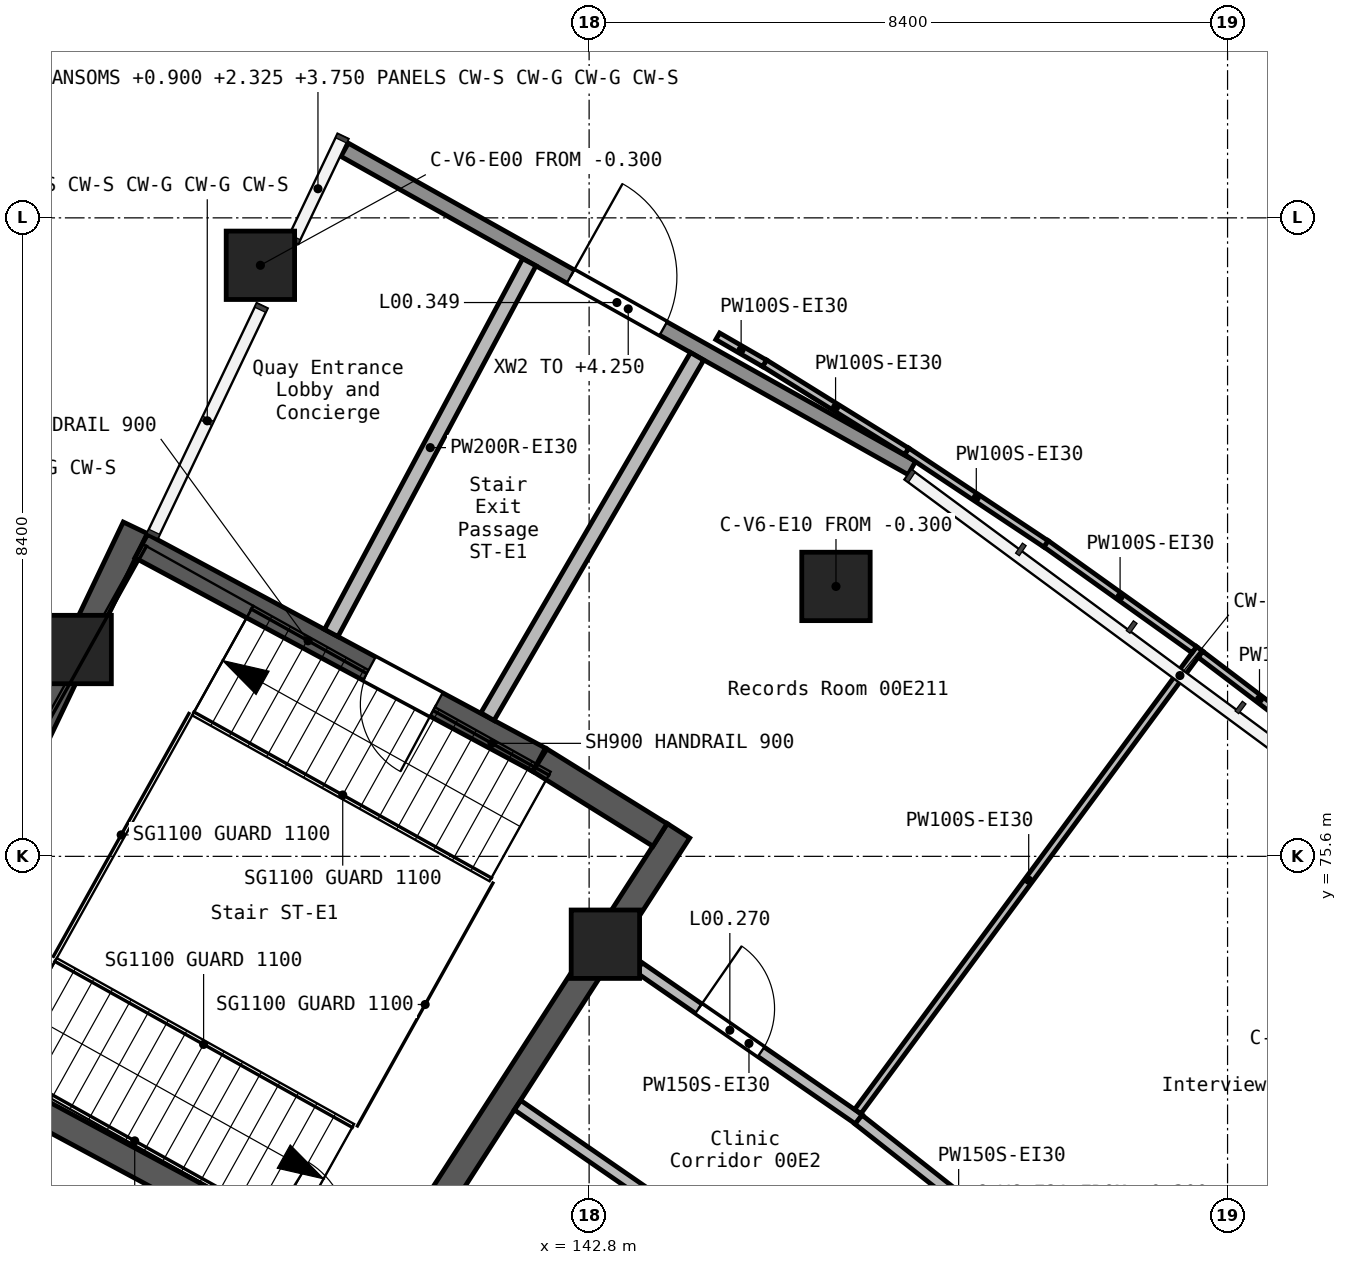
"""IFC4 building model, lengths in metres.
Left out: names, types, materials, properties, quantities, classifications, styles, units other than length and angle.
Written with IfcOpenShell. Run it as: python <this file> out.ifc"""

import sys

from ifc_helpers import new_model, si_unit, direction, frame, frame_2d, origin, origin_2d, place, context, subcontext, project, spatial, rectangle, extrude, element, fill, save


model = new_model("IFC4")
c1 = context("Model", 3, precision=1e-05, world=origin(), true_north=direction((0.0, 1.0)))
c2 = subcontext(c1, "Body", "Model", "MODEL_VIEW")
j1 = project(units=[si_unit("LENGTHUNIT", "METRE"), si_unit("PLANEANGLEUNIT", "RADIAN")], contexts=[c1])
p1 = place(None, origin())
s1 = spatial("IfcSite", under=j1, at=p1, CompositionType="ELEMENT")
p2 = place(p1, origin())
s2 = spatial("IfcBuilding", under=s1, at=p2, CompositionType="ELEMENT")
p3 = place(p2, origin())
s3 = spatial("IfcBuildingStorey", under=s2, at=p3, CompositionType="ELEMENT", Elevation=0.0)
for number, where, z_axis, x_axis in (
    (1, (136.064, 78.321, -0.3), (0.0, 0.0, 1.0), (1.0, 0.0, 0.0)),
    (2, (138.475, 83.376, -0.3), (0.0, 0.0, 1.0), (1.0, 0.0, 0.0)),
    (3, (143.014, 74.444, -0.3), (0.0, 0.0, 1.0), (1.0, 0.0, 0.0)),
    (4, (146.048, 79.151, -0.3), (0.0, 0.0, 1.0), (1.0, 0.0, 0.0)),
):
    element("IfcColumn", number, at=place(p3, frame(where, z_axis=z_axis, x_axis=x_axis)), inside=s3, PredefinedType="COLUMN", context=c2, shape_type="SweptSolid", body=[
        extrude(rectangle(XDim=0.9, YDim=0.9, at=origin_2d()), origin(), (0.0, 0.0, 1.0), 5.7),
    ])
p4 = place(p3, frame((133.578, 73.109, -0.3), z_axis=(0.0, 0.0, 1.0), x_axis=(0.430592498036, 0.90254645345, 0.0)))
e5 = element("IfcWall", 5, at=p4, inside=s3, PredefinedType="SHEAR", context=c2, shape_type="SweptSolid", body=[
    extrude(rectangle(XDim=7.55, YDim=0.35, at=frame_2d((3.775, 0.0))), origin(), (0.0, 0.0, 1.0), 5.7),
])
p5 = place(p3, frame((138.436, 70.698, -0.3), z_axis=(0.0, 0.0, 1.0), x_axis=(-0.880959996263, 0.473190749048, 0.0)))
e6 = element("IfcWall", 6, at=p5, inside=s3, PredefinedType="SHEAR", context=c2, shape_type="SweptSolid", body=[
    extrude(rectangle(XDim=5.254, YDim=0.35, at=frame_2d((2.627, 0.0))), origin(), (0.0, 0.0, 1.0), 5.7),
])
p6 = place(p3, frame((140.074, 69.885, -0.3), z_axis=(0.0, 0.0, 1.0), x_axis=(0.541951537975, 0.840409739643, 0.0)))
e7 = element("IfcWall", 7, at=p6, inside=s3, PredefinedType="SHEAR", context=c2, shape_type="SweptSolid", body=[
    extrude(rectangle(XDim=7.2, YDim=0.35, at=frame_2d((3.6, 0.0))), origin(), (0.0, 0.0, 1.0), 5.7),
])
p7 = place(p3, frame((142.142, 76.871, -0.3), z_axis=(0.0, 0.0, 1.0), x_axis=(-0.880979840223, 0.473153802817, 0.0)))
e8 = element("IfcWall", 8, at=p7, inside=s3, PredefinedType="SHEAR", context=c2, shape_type="SweptSolid", body=[
    extrude(rectangle(XDim=5.942, YDim=0.35, at=frame_2d((2.971, 0.0))), origin(), (0.0, 0.0, 1.0), 5.7),
])
p8 = place(p7, frame((1.535, 0.0, 0.3)))
e9 = element("IfcOpeningElement", 9, at=p8, cuts=e8, PredefinedType="OPENING", context=c2, shape_type="SweptSolid", body=[
    extrude(rectangle(XDim=1.0, YDim=2.1, at=frame_2d((0.5, 1.05))), frame((0.0, 0.185, 0.0), z_axis=(0.0, -1.0, 0.0), x_axis=(1.0, 0.0, 0.0)), (0.0, 0.0, 1.0), 0.37),
])
p9 = place(p3, frame((142.152, 76.865, -0.3), z_axis=(0.0, 0.0, 1.0), x_axis=(0.849013462734, -0.528371214296, 0.0)))
e10 = element("IfcWall", 10, at=p9, inside=s3, PredefinedType="SHEAR", context=c2, shape_type="SweptSolid", body=[
    extrude(rectangle(XDim=1.862, YDim=0.35, at=frame_2d((0.931, 0.0))), origin(), (0.0, 0.0, 1.0), 5.7),
])
p10 = place(p3, frame((139.583, 84.896, 0.0), z_axis=(0.0, 0.0, 1.0), x_axis=(0.872117504565, -0.489296493172, 0.0)))
e11 = element("IfcWall", 11, at=p10, inside=s3, PredefinedType="STANDARD", context=c2, shape_type="SweptSolid", body=[
    extrude(rectangle(XDim=8.557, YDim=0.2, at=frame_2d((4.279, 0.0))), origin(), (0.0, 0.0, 1.0), 4.25),
])
p11 = place(p10, frame((3.408, 0.0, 0.0)))
e12 = element("IfcOpeningElement", 12, at=p11, cuts=e11, PredefinedType="OPENING", context=c2, shape_type="SweptSolid", body=[
    extrude(rectangle(XDim=1.4, YDim=2.1, at=frame_2d((0.7, 1.05))), frame((0.0, 0.11, 0.0), z_axis=(0.0, -1.0, 0.0), x_axis=(1.0, 0.0, 0.0)), (0.0, 0.0, 1.0), 0.22),
])
p12 = place(p3, frame((139.407, 78.539, 0.0), z_axis=(0.0, 0.0, 1.0), x_axis=(0.471243461958, 0.882003174349, 0.0)))
e13 = element("IfcWall", 13, at=p12, inside=s3, PredefinedType="SOLIDWALL", context=c2, shape_type="SweptSolid", body=[
    extrude(rectangle(XDim=5.53, YDim=0.2, at=frame_2d((2.765, 0.0))), origin(), (0.0, 0.0, 1.0), 5.05),
])
p13 = place(p3, frame((141.463, 77.438, 0.0), z_axis=(0.0, 0.0, 1.0), x_axis=(0.502946190311, 0.864317724944, 0.0)))
e14 = element("IfcWall", 14, at=p13, inside=s3, PredefinedType="SOLIDWALL", context=c2, shape_type="SweptSolid", body=[
    extrude(rectangle(XDim=5.484, YDim=0.2, at=frame_2d((2.742, 0.0))), origin(), (0.0, 0.0, 1.0), 5.05),
])
p14 = place(p3, frame((143.456, 74.139, 0.0), z_axis=(0.0, 0.0, 1.0), x_axis=(0.822701427784, -0.568473711549, 0.0)))
e15 = element("IfcWall", 15, at=p14, inside=s3, PredefinedType="PARTITIONING", context=c2, shape_type="SweptSolid", body=[
    extrude(rectangle(XDim=3.519, YDim=0.15, at=frame_2d((1.759, 0.0))), origin(), (0.0, 0.0, 1.0), 5.05),
])
p15 = place(p14, frame((0.953, 0.0, 0.0)))
e16 = element("IfcOpeningElement", 16, at=p15, cuts=e15, PredefinedType="OPENING", context=c2, shape_type="SweptSolid", body=[
    extrude(rectangle(XDim=1.0, YDim=2.1, at=frame_2d((0.5, 1.05))), frame((0.0, 0.085, 0.0), z_axis=(0.0, -1.0, 0.0), x_axis=(1.0, 0.0, 0.0)), (0.0, 0.0, 1.0), 0.17),
])
p16 = place(p3, frame((146.344, 72.137, 0.0), z_axis=(0.0, 0.0, 1.0), x_axis=(0.784832511111, -0.619707938874, 0.0)))
e17 = element("IfcWall", 17, at=p16, inside=s3, PredefinedType="PARTITIONING", context=c2, shape_type="SweptSolid", body=[
    extrude(rectangle(XDim=3.358, YDim=0.15, at=frame_2d((1.679, 0.0))), origin(), (0.0, 0.0, 1.0), 5.05),
])
p17 = place(p3, frame((141.859, 72.326, 0.0), z_axis=(0.0, 0.0, 1.0), x_axis=(0.822680463987, -0.568504049391, 0.0)))
e18 = element("IfcWall", 18, at=p17, inside=s3, PredefinedType="PARTITIONING", context=c2, shape_type="SweptSolid", body=[
    extrude(rectangle(XDim=3.58, YDim=0.15, at=frame_2d((1.79, 0.0))), origin(), (0.0, 0.0, 1.0), 5.05),
])
p18 = place(p3, frame((146.334, 72.243, 0.0), z_axis=(0.0, 0.0, 1.0), x_axis=(0.594359314976, 0.804199605012, 0.0)))
e19 = element("IfcWall", 19, at=p18, inside=s3, PredefinedType="PARTITIONING", context=c2, shape_type="SweptSolid", body=[
    extrude(rectangle(XDim=7.568, YDim=0.1, at=frame_2d((3.784, 0.0))), origin(), (0.0, 0.0, 1.0), 5.05),
])
p19 = place(p3, frame((148.81, 79.713, 0.0), z_axis=(0.0, 0.0, 1.0), x_axis=(0.813602775044, -0.581421124866, 0.0)))
e20 = element("IfcWall", 20, at=p19, inside=s3, PredefinedType="PARTITIONING", context=c2, shape_type="SweptSolid", body=[
    extrude(rectangle(XDim=2.398, YDim=0.1, at=frame_2d((1.199, 0.0))), origin(), (0.0, 0.0, 1.0), 5.05),
])
p20 = place(p3, frame((146.977, 80.93, 0.0), z_axis=(0.0, 0.0, 1.0), x_axis=(0.832749063635, -0.553650609152, 0.0)))
e21 = element("IfcWall", 21, at=p20, inside=s3, PredefinedType="PARTITIONING", context=c2, shape_type="SweptSolid", body=[
    extrude(rectangle(XDim=2.202, YDim=0.1, at=frame_2d((1.101, 0.0))), origin(), (0.0, 0.0, 1.0), 5.05),
])
p21 = place(p3, frame((145.107, 82.088, 0.0), z_axis=(0.0, 0.0, 1.0), x_axis=(0.849645306831, -0.527354579557, 0.0)))
e22 = element("IfcWall", 22, at=p21, inside=s3, PredefinedType="PARTITIONING", context=c2, shape_type="SweptSolid", body=[
    extrude(rectangle(XDim=2.201, YDim=0.1, at=frame_2d((1.101, 0.0))), origin(), (0.0, 0.0, 1.0), 5.05),
])
p22 = place(p3, frame((150.843, 78.258, 0.0), z_axis=(0.0, 0.0, 1.0), x_axis=(0.796261035584, -0.604953190925, 0.0)))
e23 = element("IfcWall", 23, at=p22, inside=s3, PredefinedType="PARTITIONING", context=c2, shape_type="SweptSolid", body=[
    extrude(rectangle(XDim=1.951, YDim=0.1, at=frame_2d((0.976, 0.0))), origin(), (0.0, 0.0, 1.0), 5.05),
])
p23 = place(p3, frame((144.492, 82.442, 0.0), z_axis=(0.0, 0.0, 1.0), x_axis=(0.865739479265, -0.500494909107, 0.0)))
e24 = element("IfcWall", 24, at=p23, inside=s3, PredefinedType="PARTITIONING", context=c2, shape_type="SweptSolid", body=[
    extrude(rectangle(XDim=0.711, YDim=0.1, at=frame_2d((0.355, 0.0))), origin(), (0.0, 0.0, 1.0), 5.05),
])
p24 = place(p11, origin())
e25 = element("IfcDoor", 25, at=p24, inside=s3, OperationType="SINGLE_SWING_LEFT", PredefinedType="DOOR", context=c2, shape_type="SweptSolid", body=[
    extrude(rectangle(XDim=1.4, YDim=2.1, at=frame_2d((0.7, 1.05))), frame((0.0, 0.025, 0.0), z_axis=(0.0, -1.0, 0.0), x_axis=(1.0, 0.0, 0.0)), (0.0, 0.0, 1.0), 0.05),
])
fill(e12, e25)
p25 = place(p8, frame((1.0, 0.0, 0.0), z_axis=(0.0, 0.0, 1.0), x_axis=(-1.0, 0.0, 0.0)))
e26 = element("IfcDoor", 26, at=p25, inside=s3, OperationType="SINGLE_SWING_RIGHT", PredefinedType="DOOR", context=c2, shape_type="SweptSolid", body=[
    extrude(rectangle(XDim=1.0, YDim=2.1, at=frame_2d((0.5, 1.05))), frame((0.0, 0.025, 0.0), z_axis=(0.0, -1.0, 0.0), x_axis=(1.0, 0.0, 0.0)), (0.0, 0.0, 1.0), 0.05),
])
fill(e9, e26)
p26 = place(p15, origin())
e27 = element("IfcDoor", 27, at=p26, inside=s3, OperationType="SINGLE_SWING_LEFT", PredefinedType="DOOR", context=c2, shape_type="SweptSolid", body=[
    extrude(rectangle(XDim=1.0, YDim=2.1, at=frame_2d((0.5, 1.05))), frame((0.0, 0.025, 0.0), z_axis=(0.0, -1.0, 0.0), x_axis=(1.0, 0.0, 0.0)), (0.0, 0.0, 1.0), 0.05),
])
fill(e16, e27)
save(model, sys.argv[1])
